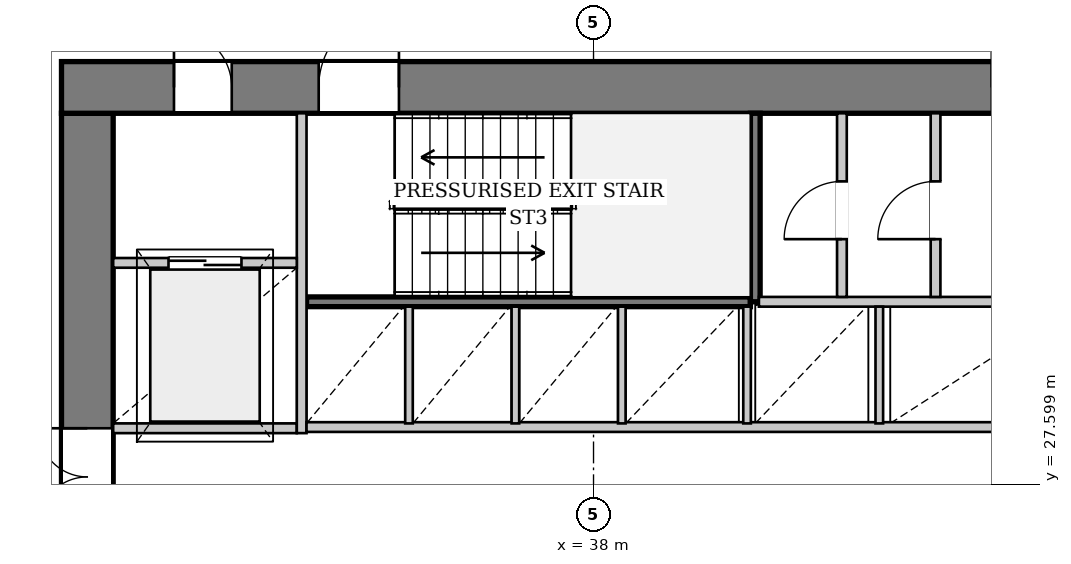
"""IFC4 building model, lengths in metres.
Left out: names, types, materials, properties, quantities, classifications, styles, units other than length and angle.
Written with IfcOpenShell. Run it as: python <this file> out.ifc"""

import sys

from ifc_helpers import new_model, si_unit, direction, frame, frame_2d, origin, place, context, subcontext, project, spatial, rectangle, extrude, source, transform, mapped, element, fill, save


model = new_model("IFC4")
c1 = context("Model", 3, precision=1e-05, world=origin(), true_north=direction((0.0, 1.0)))
c2 = subcontext(c1, "Body", "Model", "MODEL_VIEW")
j1 = project(units=[si_unit("LENGTHUNIT", "METRE"), si_unit("PLANEANGLEUNIT", "RADIAN")], contexts=[c1])
p1 = place(None, origin())
s1 = spatial("IfcSite", under=j1, at=p1, CompositionType="ELEMENT")
p2 = place(p1, origin())
s2 = spatial("IfcBuilding", under=s1, at=p2, CompositionType="ELEMENT")
p3 = place(p2, frame((0.0, 0.0, 39.95)))
s3 = spatial("IfcBuildingStorey", under=s2, at=p3, CompositionType="ELEMENT", Elevation=39.95)
p4 = place(p3, frame((29.675, 19.5, 0.0), z_axis=(0.0, 0.0, 1.0), x_axis=(0.0, 1.0, 0.0)))
e1 = element("IfcWall", 1, at=p4, inside=s3, PredefinedType="SHEAR", context=c2, shape_type="SweptSolid", body=[
    extrude(rectangle(XDim=14.2, YDim=0.85, at=frame_2d((7.1, 0.0))), origin(), (0.0, 0.0, 1.0), 3.3),
])
p5 = place(p4, frame((7.42, 0.0, 0.0)))
e2 = element("IfcOpeningElement", 2, at=p5, cuts=e1, PredefinedType="OPENING", context=c2, shape_type="SweptSolid", body=[
    extrude(rectangle(XDim=1.6, YDim=2.2, at=frame_2d((0.8, 1.1))), frame((0.0, 0.435, 0.0), z_axis=(0.0, -1.0, 0.0), x_axis=(1.0, 0.0, 0.0)), (0.0, 0.0, 1.0), 0.87),
])
p6 = place(p3, frame((29.25, 34.125, 0.0), z_axis=(0.0, 0.0, 1.0), x_axis=(1.0, 0.0, 0.0)))
e3 = element("IfcWall", 3, at=p6, inside=s3, PredefinedType="SHEAR", context=c2, shape_type="SweptSolid", body=[
    extrude(rectangle(XDim=17.5, YDim=0.85, at=frame_2d((8.75, 0.0))), origin(), (0.0, 0.0, 1.0), 3.3),
])
p7 = place(p6, frame((1.85, 0.0, 0.0)))
e4 = element("IfcOpeningElement", 4, at=p7, cuts=e3, PredefinedType="OPENING", context=c2, shape_type="SweptSolid", body=[
    extrude(rectangle(XDim=0.95, YDim=2.1, at=frame_2d((0.475, 1.05))), frame((0.0, 0.435, 0.0), z_axis=(0.0, -1.0, 0.0), x_axis=(1.0, 0.0, 0.0)), (0.0, 0.0, 1.0), 0.87),
])
p8 = place(p6, frame((4.23, 0.0, 0.0)))
e5 = element("IfcOpeningElement", 5, at=p8, cuts=e3, PredefinedType="OPENING", context=c2, shape_type="SweptSolid", body=[
    extrude(rectangle(XDim=1.32, YDim=2.2, at=frame_2d((0.66, 1.1))), frame((0.0, 0.435, 0.0), z_axis=(0.0, -1.0, 0.0), x_axis=(1.0, 0.0, 0.0)), (0.0, 0.0, 1.0), 0.87),
])
p9 = place(p6, frame((15.3, 0.0, 0.0)))
e6 = element("IfcOpeningElement", 6, at=p9, cuts=e3, PredefinedType="OPENING", context=c2, shape_type="SweptSolid", body=[
    extrude(rectangle(XDim=0.95, YDim=2.1, at=frame_2d((0.475, 1.05))), frame((0.0, 0.435, 0.0), z_axis=(0.0, -1.0, 0.0), x_axis=(1.0, 0.0, 0.0)), (0.0, 0.0, 1.0), 0.87),
])
p10 = place(p3, frame((33.28, 30.6, 0.0), z_axis=(0.0, 0.0, 1.0), x_axis=(1.0, 0.0, 0.0)))
e7 = element("IfcWall", 7, at=p10, inside=s3, PredefinedType="PARTITIONING", context=c2, shape_type="SweptSolid", body=[
    extrude(rectangle(XDim=7.3, YDim=0.16, at=frame_2d((3.65, 0.0))), origin(), (0.0, 0.0, 1.0), 3.3),
])
p11 = place(p3, frame((40.66, 30.6, 0.0), z_axis=(0.0, 0.0, 1.0), x_axis=(0.0, 1.0, 0.0)))
e8 = element("IfcWall", 8, at=p11, inside=s3, PredefinedType="PARTITIONING", context=c2, shape_type="SweptSolid", body=[
    extrude(rectangle(XDim=3.1, YDim=0.16, at=frame_2d((1.55, 0.0))), origin(), (0.0, 0.0, 1.0), 3.3),
])
p12 = place(p3, frame((30.1, 28.52, 0.0), z_axis=(0.0, 0.0, 1.0), x_axis=(1.0, 0.0, 0.0)))
e9 = element("IfcWall", 9, at=p12, inside=s3, PredefinedType="PARTITIONING", context=c2, shape_type="SweptSolid", body=[
    extrude(rectangle(XDim=3.02, YDim=0.16, at=frame_2d((1.51, 0.0))), origin(), (0.0, 0.0, 1.0), 3.3),
])
p13 = place(p3, frame((33.2, 28.44, 0.0), z_axis=(0.0, 0.0, 1.0), x_axis=(0.0, 1.0, 0.0)))
e10 = element("IfcWall", 10, at=p13, inside=s3, PredefinedType="PARTITIONING", context=c2, shape_type="SweptSolid", body=[
    extrude(rectangle(XDim=5.26, YDim=0.16, at=frame_2d((2.63, 0.0))), origin(), (0.0, 0.0, 1.0), 3.3),
])
p14 = place(p3, frame((30.1, 31.24, 0.0), z_axis=(0.0, 0.0, 1.0), x_axis=(1.0, 0.0, 0.0)))
e11 = element("IfcWall", 11, at=p14, inside=s3, PredefinedType="PARTITIONING", context=c2, shape_type="SweptSolid", body=[
    extrude(rectangle(XDim=3.02, YDim=0.16, at=frame_2d((1.51, 0.0))), origin(), (0.0, 0.0, 1.0), 3.3),
])
p15 = place(p14, frame((0.91, 0.0, 0.0)))
e12 = element("IfcOpeningElement", 12, at=p15, cuts=e11, PredefinedType="OPENING", context=c2, shape_type="SweptSolid", body=[
    extrude(rectangle(XDim=1.2, YDim=2.2, at=frame_2d((0.6, 1.1))), frame((0.0, 0.09, 0.0), z_axis=(0.0, -1.0, 0.0), x_axis=(1.0, 0.0, 0.0)), (0.0, 0.0, 1.0), 0.18),
])
p16 = place(p3, frame((33.28, 28.54, 0.0), z_axis=(0.0, 0.0, 1.0), x_axis=(1.0, 0.0, 0.0)))
e13 = element("IfcWall", 13, at=p16, inside=s3, PredefinedType="PARTITIONING", context=c2, shape_type="SweptSolid", body=[
    extrude(rectangle(XDim=12.62, YDim=0.16, at=frame_2d((6.31, 0.0))), origin(), (0.0, 0.0, 1.0), 3.3),
])
p17 = place(p3, frame((40.72, 30.6, 0.0), z_axis=(0.0, 0.0, 1.0), x_axis=(1.0, 0.0, 0.0)))
e14 = element("IfcWall", 14, at=p17, inside=s3, PredefinedType="PARTITIONING", context=c2, shape_type="SweptSolid", body=[
    extrude(rectangle(XDim=5.18, YDim=0.16, at=frame_2d((2.59, 0.0))), origin(), (0.0, 0.0, 1.0), 3.3),
])
for number, where, z_axis, x_axis in (
    (15, (34.965, 28.6, 0.0), (0.0, 0.0, 1.0), (0.0, 1.0, 0.0)),
    (16, (36.715, 28.6, 0.0), (0.0, 0.0, 1.0), (0.0, 1.0, 0.0)),
    (17, (38.465, 28.6, 0.0), (0.0, 0.0, 1.0), (0.0, 1.0, 0.0)),
    (18, (40.525, 28.6, 0.0), (0.0, 0.0, 1.0), (0.0, 1.0, 0.0)),
    (19, (42.7, 28.6, 0.0), (0.0, 0.0, 1.0), (0.0, 1.0, 0.0)),
):
    element("IfcWall", number, at=place(p3, frame(where, z_axis=z_axis, x_axis=x_axis)), inside=s3, PredefinedType="PARTITIONING", context=c2, shape_type="SweptSolid", body=[
        extrude(rectangle(XDim=1.92, YDim=0.125, at=frame_2d((0.96, 0.0))), origin(), (0.0, 0.0, 1.0), 3.3),
    ])
p18 = place(p3, frame((42.085, 30.68, 0.0), z_axis=(0.0, 0.0, 1.0), x_axis=(0.0, 1.0, 0.0)))
e20 = element("IfcWall", 20, at=p18, inside=s3, PredefinedType="PARTITIONING", context=c2, shape_type="SweptSolid", body=[
    extrude(rectangle(XDim=3.02, YDim=0.16, at=frame_2d((1.51, 0.0))), origin(), (0.0, 0.0, 1.0), 3.3),
])
p19 = place(p18, frame((0.95, 0.0, 0.0)))
e21 = element("IfcOpeningElement", 21, at=p19, cuts=e20, PredefinedType="OPENING", context=c2, shape_type="SweptSolid", body=[
    extrude(rectangle(XDim=0.95, YDim=2.1, at=frame_2d((0.475, 1.05))), frame((0.0, 0.09, 0.0), z_axis=(0.0, -1.0, 0.0), x_axis=(1.0, 0.0, 0.0)), (0.0, 0.0, 1.0), 0.18),
])
p20 = place(p3, frame((43.625, 30.68, 0.0), z_axis=(0.0, 0.0, 1.0), x_axis=(0.0, 1.0, 0.0)))
e22 = element("IfcWall", 22, at=p20, inside=s3, PredefinedType="PARTITIONING", context=c2, shape_type="SweptSolid", body=[
    extrude(rectangle(XDim=3.02, YDim=0.16, at=frame_2d((1.51, 0.0))), origin(), (0.0, 0.0, 1.0), 3.3),
])
p21 = place(p20, frame((0.95, 0.0, 0.0)))
e23 = element("IfcOpeningElement", 23, at=p21, cuts=e22, PredefinedType="OPENING", context=c2, shape_type="SweptSolid", body=[
    extrude(rectangle(XDim=0.95, YDim=2.1, at=frame_2d((0.475, 1.05))), frame((0.0, 0.09, 0.0), z_axis=(0.0, -1.0, 0.0), x_axis=(1.0, 0.0, 0.0)), (0.0, 0.0, 1.0), 0.18),
])
m1 = source(origin(), c2, "Body", "SweptSolid", [
    extrude(rectangle(XDim=1.6, YDim=2.2, at=frame_2d((0.8, 1.1))), frame((0.0, 0.025, 0.0), z_axis=(0.0, -1.0, 0.0), x_axis=(1.0, 0.0, 0.0)), (0.0, 0.0, 1.0), 0.05),
])
p22 = place(p5, origin())
e24 = element("IfcDoor", 24, at=p22, inside=s3, OperationType="DOUBLE_DOOR_SINGLE_SWING", PredefinedType="DOOR", context=c2, shape_type="MappedRepresentation", body=[
    mapped(m1, transform((0.0, 0.0, 0.0), x_axis=(1.0, 0.0, 0.0), y_axis=(0.0, 1.0, 0.0), z_axis=(0.0, 0.0, 1.0), scale=1.0)),
])
fill(e2, e24)
m2 = source(origin(), c2, "Body", "SweptSolid", [
    extrude(rectangle(XDim=0.95, YDim=2.1, at=frame_2d((0.475, 1.05))), frame((0.0, 0.025, 0.0), z_axis=(0.0, -1.0, 0.0), x_axis=(1.0, 0.0, 0.0)), (0.0, 0.0, 1.0), 0.05),
])
p23 = place(p7, origin())
e25 = element("IfcDoor", 25, at=p23, inside=s3, OperationType="SINGLE_SWING_LEFT", PredefinedType="DOOR", context=c2, shape_type="MappedRepresentation", body=[
    mapped(m2, transform((0.0, 0.0, 0.0), x_axis=(1.0, 0.0, 0.0), y_axis=(0.0, 1.0, 0.0), z_axis=(0.0, 0.0, 1.0), scale=1.0)),
])
fill(e4, e25)
m3 = source(origin(), c2, "Body", "SweptSolid", [
    extrude(rectangle(XDim=1.32, YDim=2.2, at=frame_2d((0.66, 1.1))), frame((0.0, 0.025, 0.0), z_axis=(0.0, -1.0, 0.0), x_axis=(1.0, 0.0, 0.0)), (0.0, 0.0, 1.0), 0.05),
])
p24 = place(p8, origin())
e26 = element("IfcDoor", 26, at=p24, inside=s3, OperationType="SINGLE_SWING_RIGHT", PredefinedType="DOOR", context=c2, shape_type="MappedRepresentation", body=[
    mapped(m3, transform((0.0, 0.0, 0.0), x_axis=(1.0, 0.0, 0.0), y_axis=(0.0, 1.0, 0.0), z_axis=(0.0, 0.0, 1.0), scale=1.0)),
])
fill(e5, e26)
m4 = source(origin(), c2, "Body", "SweptSolid", [
    extrude(rectangle(XDim=1.2, YDim=2.2, at=frame_2d((0.6, 1.1))), frame((0.0, 0.025, 0.0), z_axis=(0.0, -1.0, 0.0), x_axis=(1.0, 0.0, 0.0)), (0.0, 0.0, 1.0), 0.05),
])
p25 = place(p15, origin())
e27 = element("IfcDoor", 27, at=p25, inside=s3, OperationType="DOUBLE_DOOR_SLIDING", PredefinedType="DOOR", context=c2, shape_type="MappedRepresentation", body=[
    mapped(m4, transform((0.0, 0.0, 0.0), x_axis=(1.0, 0.0, 0.0), y_axis=(0.0, 1.0, 0.0), z_axis=(0.0, 0.0, 1.0), scale=1.0)),
])
fill(e12, e27)
p26 = place(p19, origin())
e28 = element("IfcDoor", 28, at=p26, inside=s3, OperationType="SINGLE_SWING_LEFT", PredefinedType="DOOR", context=c2, shape_type="MappedRepresentation", body=[
    mapped(m2, transform((0.0, 0.0, 0.0), x_axis=(1.0, 0.0, 0.0), y_axis=(0.0, 1.0, 0.0), z_axis=(0.0, 0.0, 1.0), scale=1.0)),
])
fill(e21, e28)
p27 = place(p21, origin())
e29 = element("IfcDoor", 29, at=p27, inside=s3, OperationType="SINGLE_SWING_LEFT", PredefinedType="DOOR", context=c2, shape_type="MappedRepresentation", body=[
    mapped(m2, transform((0.0, 0.0, 0.0), x_axis=(1.0, 0.0, 0.0), y_axis=(0.0, 1.0, 0.0), z_axis=(0.0, 0.0, 1.0), scale=1.0)),
])
fill(e23, e29)
save(model, sys.argv[1])
